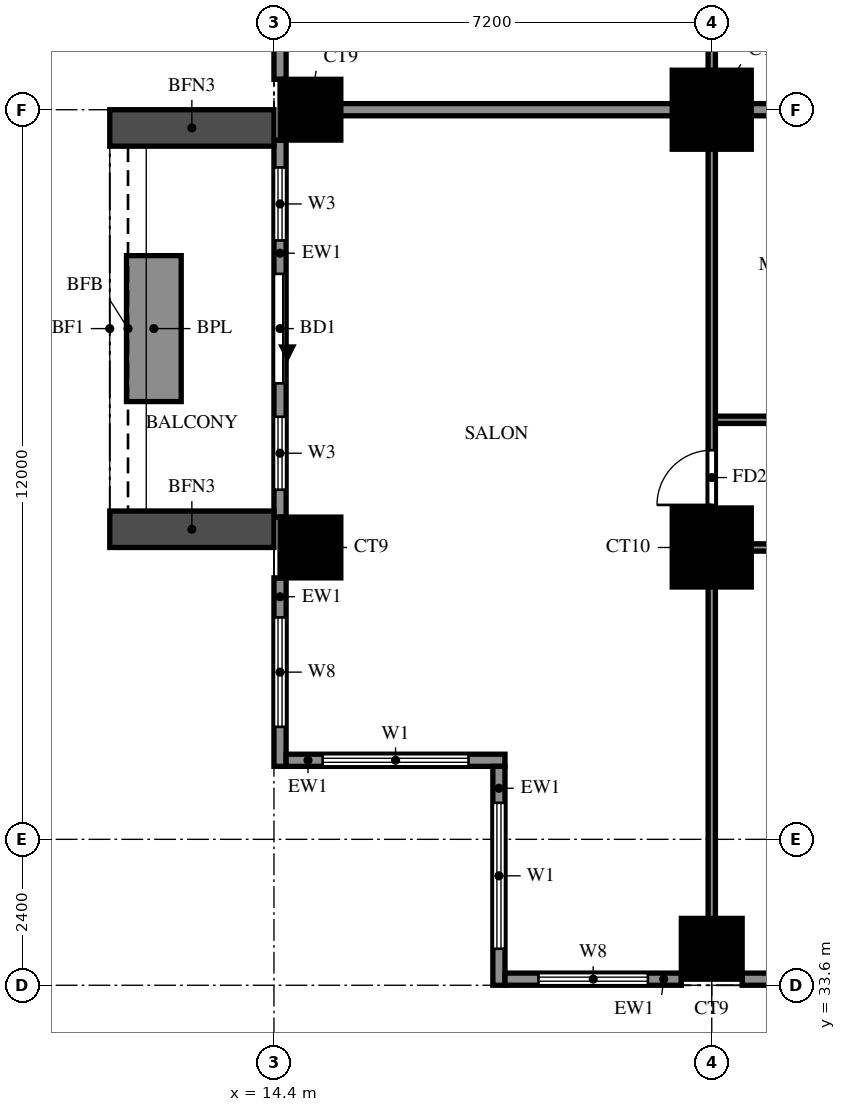
"""IFC4 building model, lengths in metres.
Left out: names, types, materials, properties, quantities, classifications, styles, units other than length and angle.
Written with IfcOpenShell. Run it as: python <this file> out.ifc"""

import sys

from ifc_helpers import new_model, si_unit, direction, frame, frame_2d, origin, origin_2d, place, context, subcontext, project, spatial, rectangle, extrude, source, transform, mapped, element, fill, save


model = new_model("IFC4")
c1 = context("Model", 3, precision=1e-05, world=origin(), true_north=direction((0.0, 1.0)))
c2 = subcontext(c1, "Body", "Model", "MODEL_VIEW")
j1 = project(units=[si_unit("LENGTHUNIT", "METRE"), si_unit("PLANEANGLEUNIT", "RADIAN")], contexts=[c1])
p1 = place(None, origin())
s1 = spatial("IfcSite", under=j1, at=p1, CompositionType="ELEMENT")
p2 = place(p1, origin())
s2 = spatial("IfcBuilding", under=s1, at=p2, CompositionType="ELEMENT")
p3 = place(p2, frame((0.0, 0.0, 69.0)))
s3 = spatial("IfcBuildingStorey", under=s2, at=p3, CompositionType="ELEMENT", Elevation=69.0)
m1 = source(origin(), c2, "Body", "SweptSolid", [
    extrude(rectangle(XDim=1.0, YDim=1.0, at=origin_2d()), origin(), (0.0, 0.0, 1.0), 3.18),
])
for number, where, z_axis, x_axis in (
    (1, (21.6, 34.2, 0.0), (0.0, 0.0, 1.0), (1.0, 0.0, 0.0)),
    (2, (15.0, 40.8, 0.0), (0.0, 0.0, 1.0), (1.0, 0.0, 0.0)),
):
    element("IfcColumn", number, at=place(p3, frame(where, z_axis=z_axis, x_axis=x_axis)), inside=s3, PredefinedType="COLUMN", context=c2, shape_type="MappedRepresentation", body=[
        mapped(m1, transform((0.0, 0.0, 0.0))),
    ])
m2 = source(origin(), c2, "Body", "SweptSolid", [
    extrude(rectangle(XDim=1.3, YDim=1.3, at=origin_2d()), origin(), (0.0, 0.0, 1.0), 3.18),
])
p4 = place(p3, frame((21.6, 40.8, 0.0), z_axis=(0.0, 0.0, 1.0), x_axis=(1.0, 0.0, 0.0)))
e3 = element("IfcColumn", 3, at=p4, inside=s3, PredefinedType="COLUMN", context=c2, shape_type="MappedRepresentation", body=[
    mapped(m2, transform((0.0, 0.0, 0.0))),
])
p5 = place(p3, frame((15.0, 48.0, 0.0), z_axis=(0.0, 0.0, 1.0), x_axis=(1.0, 0.0, 0.0)))
e4 = element("IfcColumn", 4, at=p5, inside=s3, PredefinedType="COLUMN", context=c2, shape_type="MappedRepresentation", body=[
    mapped(m1, transform((0.0, 0.0, 0.0))),
])
p6 = place(p3, frame((21.6, 48.0, 0.0), z_axis=(0.0, 0.0, 1.0), x_axis=(1.0, 0.0, 0.0)))
e5 = element("IfcColumn", 5, at=p6, inside=s3, PredefinedType="COLUMN", context=c2, shape_type="MappedRepresentation", body=[
    mapped(m2, transform((0.0, 0.0, 0.0))),
])
p7 = place(p3, frame((14.5, 54.7, 0.0), z_axis=(0.0, 0.0, 1.0), x_axis=(0.0, -1.0, 0.0)))
e6 = element("IfcWall", 6, at=p7, inside=s3, PredefinedType="SOLIDWALL", context=c2, shape_type="SweptSolid", body=[
    extrude(rectangle(XDim=6.2, YDim=0.2, at=frame_2d((3.1, 0.0))), origin(), (0.0, 0.0, 1.0), 3.18),
])
p8 = place(p7, frame((3.65, 0.0, 0.6)))
e7 = element("IfcOpeningElement", 7, at=p8, cuts=e6, PredefinedType="OPENING", context=c2, shape_type="SweptSolid", body=[
    extrude(rectangle(XDim=1.8, YDim=2.4, at=frame_2d((0.9, 1.2))), frame((0.0, 0.11, 0.0), z_axis=(0.0, -1.0, 0.0), x_axis=(1.0, 0.0, 0.0)), (0.0, 0.0, 1.0), 0.22),
])
p9 = place(p7, frame((0.75, 0.0, 0.6)))
e8 = element("IfcOpeningElement", 8, at=p9, cuts=e6, PredefinedType="OPENING", context=c2, shape_type="SweptSolid", body=[
    extrude(rectangle(XDim=1.8, YDim=2.4, at=frame_2d((0.9, 1.2))), frame((0.0, 0.11, 0.0), z_axis=(0.0, -1.0, 0.0), x_axis=(1.0, 0.0, 0.0)), (0.0, 0.0, 1.0), 0.22),
])
p10 = place(p3, frame((14.5, 47.5, 0.0), z_axis=(0.0, 0.0, 1.0), x_axis=(0.0, -1.0, 0.0)))
e9 = element("IfcWall", 9, at=p10, inside=s3, PredefinedType="SOLIDWALL", context=c2, shape_type="SweptSolid", body=[
    extrude(rectangle(XDim=6.2, YDim=0.2, at=frame_2d((3.1, 0.0))), origin(), (0.0, 0.0, 1.0), 3.18),
])
p11 = place(p10, frame((2.2, 0.0, 0.0)))
e10 = element("IfcOpeningElement", 10, at=p11, cuts=e9, PredefinedType="OPENING", context=c2, shape_type="SweptSolid", body=[
    extrude(rectangle(XDim=1.8, YDim=2.4, at=frame_2d((0.9, 1.2))), frame((0.0, 0.11, 0.0), z_axis=(0.0, -1.0, 0.0), x_axis=(1.0, 0.0, 0.0)), (0.0, 0.0, 1.0), 0.22),
])
p12 = place(p10, frame((0.45, 0.0, 0.6)))
e11 = element("IfcOpeningElement", 11, at=p12, cuts=e9, PredefinedType="OPENING", context=c2, shape_type="SweptSolid", body=[
    extrude(rectangle(XDim=1.2, YDim=2.4, at=frame_2d((0.6, 1.2))), frame((0.0, 0.11, 0.0), z_axis=(0.0, -1.0, 0.0), x_axis=(1.0, 0.0, 0.0)), (0.0, 0.0, 1.0), 0.22),
])
p13 = place(p10, frame((4.55, 0.0, 0.6)))
e12 = element("IfcOpeningElement", 12, at=p13, cuts=e9, PredefinedType="OPENING", context=c2, shape_type="SweptSolid", body=[
    extrude(rectangle(XDim=1.2, YDim=2.4, at=frame_2d((0.6, 1.2))), frame((0.0, 0.11, 0.0), z_axis=(0.0, -1.0, 0.0), x_axis=(1.0, 0.0, 0.0)), (0.0, 0.0, 1.0), 0.22),
])
p14 = place(p3, frame((14.5, 40.3, 0.0), z_axis=(0.0, 0.0, 1.0), x_axis=(0.0, -1.0, 0.0)))
e13 = element("IfcWall", 13, at=p14, inside=s3, PredefinedType="SOLIDWALL", context=c2, shape_type="SweptSolid", body=[
    extrude(rectangle(XDim=3.1, YDim=0.2, at=frame_2d((1.55, 0.0))), origin(), (0.0, 0.0, 1.0), 3.18),
])
p15 = place(p14, frame((0.65, 0.0, 0.6)))
e14 = element("IfcOpeningElement", 14, at=p15, cuts=e13, PredefinedType="OPENING", context=c2, shape_type="SweptSolid", body=[
    extrude(rectangle(XDim=1.8, YDim=2.4, at=frame_2d((0.9, 1.2))), frame((0.0, 0.11, 0.0), z_axis=(0.0, -1.0, 0.0), x_axis=(1.0, 0.0, 0.0)), (0.0, 0.0, 1.0), 0.22),
])
p16 = place(p3, frame((14.6, 37.3, 0.0), z_axis=(0.0, 0.0, 1.0), x_axis=(1.0, 0.0, 0.0)))
e15 = element("IfcWall", 15, at=p16, inside=s3, PredefinedType="SOLIDWALL", context=c2, shape_type="SweptSolid", body=[
    extrude(rectangle(XDim=3.6, YDim=0.2, at=frame_2d((1.8, 0.0))), origin(), (0.0, 0.0, 1.0), 3.18),
])
p17 = place(p16, frame((0.6, 0.0, 0.6)))
e16 = element("IfcOpeningElement", 16, at=p17, cuts=e15, PredefinedType="OPENING", context=c2, shape_type="SweptSolid", body=[
    extrude(rectangle(XDim=2.4, YDim=2.4, at=frame_2d((1.2, 1.2))), frame((0.0, 0.11, 0.0), z_axis=(0.0, -1.0, 0.0), x_axis=(1.0, 0.0, 0.0)), (0.0, 0.0, 1.0), 0.22),
])
p18 = place(p3, frame((18.1, 37.2, 0.0), z_axis=(0.0, 0.0, 1.0), x_axis=(0.0, -1.0, 0.0)))
e17 = element("IfcWall", 17, at=p18, inside=s3, PredefinedType="SOLIDWALL", context=c2, shape_type="SweptSolid", body=[
    extrude(rectangle(XDim=3.6, YDim=0.2, at=frame_2d((1.8, 0.0))), origin(), (0.0, 0.0, 1.0), 3.18),
])
p19 = place(p18, frame((0.6, 0.0, 0.6)))
e18 = element("IfcOpeningElement", 18, at=p19, cuts=e17, PredefinedType="OPENING", context=c2, shape_type="SweptSolid", body=[
    extrude(rectangle(XDim=2.4, YDim=2.4, at=frame_2d((1.2, 1.2))), frame((0.0, 0.11, 0.0), z_axis=(0.0, -1.0, 0.0), x_axis=(1.0, 0.0, 0.0)), (0.0, 0.0, 1.0), 0.22),
])
p20 = place(p3, frame((18.2, 33.7, 0.0), z_axis=(0.0, 0.0, 1.0), x_axis=(1.0, 0.0, 0.0)))
e19 = element("IfcWall", 19, at=p20, inside=s3, PredefinedType="SOLIDWALL", context=c2, shape_type="SweptSolid", body=[
    extrude(rectangle(XDim=2.9, YDim=0.2, at=frame_2d((1.45, 0.0))), origin(), (0.0, 0.0, 1.0), 3.18),
])
p21 = place(p20, frame((0.55, 0.0, 0.6)))
e20 = element("IfcOpeningElement", 20, at=p21, cuts=e19, PredefinedType="OPENING", context=c2, shape_type="SweptSolid", body=[
    extrude(rectangle(XDim=1.8, YDim=2.4, at=frame_2d((0.9, 1.2))), frame((0.0, 0.11, 0.0), z_axis=(0.0, -1.0, 0.0), x_axis=(1.0, 0.0, 0.0)), (0.0, 0.0, 1.0), 0.22),
])
p22 = place(p3, frame((22.1, 33.7, 0.0), z_axis=(0.0, 0.0, 1.0), x_axis=(1.0, 0.0, 0.0)))
e21 = element("IfcWall", 21, at=p22, inside=s3, PredefinedType="SOLIDWALL", context=c2, shape_type="SweptSolid", body=[
    extrude(rectangle(XDim=6.2, YDim=0.2, at=frame_2d((3.1, 0.0))), origin(), (0.0, 0.0, 1.0), 3.18),
])
p23 = place(p22, frame((4.0, 0.0, 0.0)))
e22 = element("IfcOpeningElement", 22, at=p23, cuts=e21, PredefinedType="OPENING", context=c2, shape_type="SweptSolid", body=[
    extrude(rectangle(XDim=1.8, YDim=2.4, at=frame_2d((0.9, 1.2))), frame((0.0, 0.11, 0.0), z_axis=(0.0, -1.0, 0.0), x_axis=(1.0, 0.0, 0.0)), (0.0, 0.0, 1.0), 0.22),
])
p24 = place(p22, frame((0.45, 0.0, 0.6)))
e23 = element("IfcOpeningElement", 23, at=p24, cuts=e21, PredefinedType="OPENING", context=c2, shape_type="SweptSolid", body=[
    extrude(rectangle(XDim=1.2, YDim=2.4, at=frame_2d((0.6, 1.2))), frame((0.0, 0.11, 0.0), z_axis=(0.0, -1.0, 0.0), x_axis=(1.0, 0.0, 0.0)), (0.0, 0.0, 1.0), 0.22),
])
for number, where, z_axis, x_axis in (
    (24, (14.4, 47.7, 0.0), (0.0, 0.0, 1.0), (-1.0, 0.0, 0.0)),
    (25, (14.4, 41.1, 0.0), (0.0, 0.0, 1.0), (-1.0, 0.0, 0.0)),
):
    element("IfcWall", number, at=place(p3, frame(where, z_axis=z_axis, x_axis=x_axis)), inside=s3, PredefinedType="SOLIDWALL", context=c2, shape_type="SweptSolid", body=[
        extrude(rectangle(XDim=2.7, YDim=0.6, at=frame_2d((1.35, 0.0))), origin(), (0.0, 0.0, 1.0), 2.85),
    ])
p25 = place(p3, frame((12.425, 45.6, 0.0), z_axis=(0.0, 0.0, 1.0), x_axis=(0.0, -1.0, 0.0)))
e26 = element("IfcWall", 26, at=p25, inside=s3, PredefinedType="SOLIDWALL", context=c2, shape_type="SweptSolid", body=[
    extrude(rectangle(XDim=2.4, YDim=0.9, at=frame_2d((1.2, 0.0))), origin(), (0.0, 0.0, 1.0), 0.9),
])
p26 = place(p3, frame((14.525, 48.0, 0.0), z_axis=(0.0, 0.0, 1.0), x_axis=(1.0, 0.0, 0.0)))
e27 = element("IfcWall", 27, at=p26, inside=s3, PredefinedType="SOLIDWALL", context=c2, shape_type="SweptSolid", body=[
    extrude(rectangle(XDim=19.075, YDim=0.2, at=frame_2d((9.538, 0.0))), origin(), (0.0, 0.0, 1.0), 3.18),
])
p27 = place(p3, frame((21.6, 40.8, 0.0), z_axis=(0.0, 0.0, 1.0), x_axis=(1.0, 0.0, 0.0)))
e28 = element("IfcWall", 28, at=p27, inside=s3, PredefinedType="PARTITIONING", context=c2, shape_type="SweptSolid", body=[
    extrude(rectangle(XDim=10.8, YDim=0.12, at=frame_2d((5.4, 0.0))), origin(), (0.0, 0.0, 1.0), 3.18),
])
p28 = place(p27, frame((1.35, 0.0, 0.0)))
e29 = element("IfcOpeningElement", 29, at=p28, cuts=e28, PredefinedType="OPENING", context=c2, shape_type="SweptSolid", body=[
    extrude(rectangle(XDim=0.9, YDim=2.1, at=frame_2d((0.45, 1.05))), frame((0.0, 0.07, 0.0), z_axis=(0.0, -1.0, 0.0), x_axis=(1.0, 0.0, 0.0)), (0.0, 0.0, 1.0), 0.14),
])
p29 = place(p27, frame((4.95, 0.0, 0.0)))
e30 = element("IfcOpeningElement", 30, at=p29, cuts=e28, PredefinedType="OPENING", context=c2, shape_type="SweptSolid", body=[
    extrude(rectangle(XDim=0.9, YDim=2.1, at=frame_2d((0.45, 1.05))), frame((0.0, 0.07, 0.0), z_axis=(0.0, -1.0, 0.0), x_axis=(1.0, 0.0, 0.0)), (0.0, 0.0, 1.0), 0.14),
])
p30 = place(p27, frame((8.55, 0.0, 0.0)))
e31 = element("IfcOpeningElement", 31, at=p30, cuts=e28, PredefinedType="OPENING", context=c2, shape_type="SweptSolid", body=[
    extrude(rectangle(XDim=0.9, YDim=2.1, at=frame_2d((0.45, 1.05))), frame((0.0, 0.07, 0.0), z_axis=(0.0, -1.0, 0.0), x_axis=(1.0, 0.0, 0.0)), (0.0, 0.0, 1.0), 0.14),
])
p31 = place(p3, frame((21.6, 42.9, 0.0), z_axis=(0.0, 0.0, 1.0), x_axis=(1.0, 0.0, 0.0)))
e32 = element("IfcWall", 32, at=p31, inside=s3, PredefinedType="PARTITIONING", context=c2, shape_type="SweptSolid", body=[
    extrude(rectangle(XDim=16.8, YDim=0.12, at=frame_2d((8.4, 0.0))), origin(), (0.0, 0.0, 1.0), 3.18),
])
p32 = place(p31, frame((1.375, 0.0, 0.0)))
e33 = element("IfcOpeningElement", 33, at=p32, cuts=e32, PredefinedType="OPENING", context=c2, shape_type="SweptSolid", body=[
    extrude(rectangle(XDim=0.9, YDim=2.1, at=frame_2d((0.45, 1.05))), frame((0.0, 0.07, 0.0), z_axis=(0.0, -1.0, 0.0), x_axis=(1.0, 0.0, 0.0)), (0.0, 0.0, 1.0), 0.14),
])
p33 = place(p31, frame((5.5, 0.0, 0.0)))
e34 = element("IfcOpeningElement", 34, at=p33, cuts=e32, PredefinedType="OPENING", context=c2, shape_type="SweptSolid", body=[
    extrude(rectangle(XDim=0.9, YDim=2.1, at=frame_2d((0.45, 1.05))), frame((0.0, 0.07, 0.0), z_axis=(0.0, -1.0, 0.0), x_axis=(1.0, 0.0, 0.0)), (0.0, 0.0, 1.0), 0.14),
])
p34 = place(p31, frame((9.725, 0.0, 0.0)))
e35 = element("IfcOpeningElement", 35, at=p34, cuts=e32, PredefinedType="OPENING", context=c2, shape_type="SweptSolid", body=[
    extrude(rectangle(XDim=0.8, YDim=2.1, at=frame_2d((0.4, 1.05))), frame((0.0, 0.07, 0.0), z_axis=(0.0, -1.0, 0.0), x_axis=(1.0, 0.0, 0.0)), (0.0, 0.0, 1.0), 0.14),
])
p35 = place(p31, frame((13.95, 0.0, 0.0)))
e36 = element("IfcOpeningElement", 36, at=p35, cuts=e32, PredefinedType="OPENING", context=c2, shape_type="SweptSolid", body=[
    extrude(rectangle(XDim=0.9, YDim=2.1, at=frame_2d((0.45, 1.05))), frame((0.0, 0.07, 0.0), z_axis=(0.0, -1.0, 0.0), x_axis=(1.0, 0.0, 0.0)), (0.0, 0.0, 1.0), 0.14),
])
p36 = place(p3, frame((21.6, 33.725, 0.0), z_axis=(0.0, 0.0, 1.0), x_axis=(0.0, 1.0, 0.0)))
e37 = element("IfcWall", 37, at=p36, inside=s3, PredefinedType="PARTITIONING", context=c2, shape_type="SweptSolid", body=[
    extrude(rectangle(XDim=39.475, YDim=0.12, at=frame_2d((19.737, 0.0))), origin(), (0.0, 0.0, 1.0), 3.18),
])
p37 = place(p36, frame((7.775, 0.0, 0.0)))
e38 = element("IfcOpeningElement", 38, at=p37, cuts=e37, PredefinedType="OPENING", context=c2, shape_type="SweptSolid", body=[
    extrude(rectangle(XDim=0.9, YDim=2.1, at=frame_2d((0.45, 1.05))), frame((0.0, 0.07, 0.0), z_axis=(0.0, -1.0, 0.0), x_axis=(1.0, 0.0, 0.0)), (0.0, 0.0, 1.0), 0.14),
])
p38 = place(p36, frame((15.625, 0.0, 0.0)))
e39 = element("IfcOpeningElement", 39, at=p38, cuts=e37, PredefinedType="OPENING", context=c2, shape_type="SweptSolid", body=[
    extrude(rectangle(XDim=0.9, YDim=2.1, at=frame_2d((0.45, 1.05))), frame((0.0, 0.07, 0.0), z_axis=(0.0, -1.0, 0.0), x_axis=(1.0, 0.0, 0.0)), (0.0, 0.0, 1.0), 0.14),
])
p39 = place(p36, frame((19.225, 0.0, 0.0)))
e40 = element("IfcOpeningElement", 40, at=p39, cuts=e37, PredefinedType="OPENING", context=c2, shape_type="SweptSolid", body=[
    extrude(rectangle(XDim=0.9, YDim=2.1, at=frame_2d((0.45, 1.05))), frame((0.0, 0.07, 0.0), z_axis=(0.0, -1.0, 0.0), x_axis=(1.0, 0.0, 0.0)), (0.0, 0.0, 1.0), 0.14),
])
p40 = place(p36, frame((24.325, 0.0, 0.0)))
e41 = element("IfcOpeningElement", 41, at=p40, cuts=e37, PredefinedType="OPENING", context=c2, shape_type="SweptSolid", body=[
    extrude(rectangle(XDim=1.5, YDim=2.1, at=frame_2d((0.75, 1.05))), frame((0.0, 0.07, 0.0), z_axis=(0.0, -1.0, 0.0), x_axis=(1.0, 0.0, 0.0)), (0.0, 0.0, 1.0), 0.14),
])
p41 = place(p36, frame((30.025, 0.0, 0.0)))
e42 = element("IfcOpeningElement", 42, at=p41, cuts=e37, PredefinedType="OPENING", context=c2, shape_type="SweptSolid", body=[
    extrude(rectangle(XDim=0.9, YDim=2.1, at=frame_2d((0.45, 1.05))), frame((0.0, 0.07, 0.0), z_axis=(0.0, -1.0, 0.0), x_axis=(1.0, 0.0, 0.0)), (0.0, 0.0, 1.0), 0.14),
])
p42 = place(p36, frame((33.625, 0.0, 0.0)))
e43 = element("IfcOpeningElement", 43, at=p42, cuts=e37, PredefinedType="OPENING", context=c2, shape_type="SweptSolid", body=[
    extrude(rectangle(XDim=0.9, YDim=2.1, at=frame_2d((0.45, 1.05))), frame((0.0, 0.07, 0.0), z_axis=(0.0, -1.0, 0.0), x_axis=(1.0, 0.0, 0.0)), (0.0, 0.0, 1.0), 0.14),
])
p43 = place(p36, frame((37.225, 0.0, 0.0)))
e44 = element("IfcOpeningElement", 44, at=p43, cuts=e37, PredefinedType="OPENING", context=c2, shape_type="SweptSolid", body=[
    extrude(rectangle(XDim=0.9, YDim=2.1, at=frame_2d((0.45, 1.05))), frame((0.0, 0.07, 0.0), z_axis=(0.0, -1.0, 0.0), x_axis=(1.0, 0.0, 0.0)), (0.0, 0.0, 1.0), 0.14),
])
p44 = place(p11, origin())
e45 = element("IfcDoor", 45, at=p44, inside=s3, OperationType="DOUBLE_DOOR_SLIDING", PredefinedType="DOOR", context=c2, shape_type="SweptSolid", body=[
    extrude(rectangle(XDim=1.8, YDim=2.4, at=frame_2d((0.9, 1.2))), frame((0.0, 0.025, 0.0), z_axis=(0.0, -1.0, 0.0), x_axis=(1.0, 0.0, 0.0)), (0.0, 0.0, 1.0), 0.05),
])
fill(e10, e45)
p45 = place(p12, origin())
e46 = element("IfcWindow", 46, at=p45, inside=s3, PartitioningType="SINGLE_PANEL", PredefinedType="WINDOW", context=c2, shape_type="SweptSolid", body=[
    extrude(rectangle(XDim=1.2, YDim=2.4, at=frame_2d((0.6, 1.2))), frame((0.0, 0.03, 0.0), z_axis=(0.0, -1.0, 0.0), x_axis=(1.0, 0.0, 0.0)), (0.0, 0.0, 1.0), 0.06),
])
fill(e11, e46)
p46 = place(p13, origin())
e47 = element("IfcWindow", 47, at=p46, inside=s3, PartitioningType="SINGLE_PANEL", PredefinedType="WINDOW", context=c2, shape_type="SweptSolid", body=[
    extrude(rectangle(XDim=1.2, YDim=2.4, at=frame_2d((0.6, 1.2))), frame((0.0, 0.03, 0.0), z_axis=(0.0, -1.0, 0.0), x_axis=(1.0, 0.0, 0.0)), (0.0, 0.0, 1.0), 0.06),
])
fill(e12, e47)
p47 = place(p15, origin())
e48 = element("IfcWindow", 48, at=p47, inside=s3, PartitioningType="DOUBLE_PANEL_VERTICAL", PredefinedType="WINDOW", context=c2, shape_type="SweptSolid", body=[
    extrude(rectangle(XDim=1.8, YDim=2.4, at=frame_2d((0.9, 1.2))), frame((0.0, 0.03, 0.0), z_axis=(0.0, -1.0, 0.0), x_axis=(1.0, 0.0, 0.0)), (0.0, 0.0, 1.0), 0.06),
])
fill(e14, e48)
p48 = place(p17, origin())
e49 = element("IfcWindow", 49, at=p48, inside=s3, PartitioningType="DOUBLE_PANEL_VERTICAL", PredefinedType="WINDOW", context=c2, shape_type="SweptSolid", body=[
    extrude(rectangle(XDim=2.4, YDim=2.4, at=frame_2d((1.2, 1.2))), frame((0.0, 0.03, 0.0), z_axis=(0.0, -1.0, 0.0), x_axis=(1.0, 0.0, 0.0)), (0.0, 0.0, 1.0), 0.06),
])
fill(e16, e49)
p49 = place(p19, origin())
e50 = element("IfcWindow", 50, at=p49, inside=s3, PartitioningType="DOUBLE_PANEL_VERTICAL", PredefinedType="WINDOW", context=c2, shape_type="SweptSolid", body=[
    extrude(rectangle(XDim=2.4, YDim=2.4, at=frame_2d((1.2, 1.2))), frame((0.0, 0.03, 0.0), z_axis=(0.0, -1.0, 0.0), x_axis=(1.0, 0.0, 0.0)), (0.0, 0.0, 1.0), 0.06),
])
fill(e18, e50)
p50 = place(p21, origin())
e51 = element("IfcWindow", 51, at=p50, inside=s3, PartitioningType="DOUBLE_PANEL_VERTICAL", PredefinedType="WINDOW", context=c2, shape_type="SweptSolid", body=[
    extrude(rectangle(XDim=1.8, YDim=2.4, at=frame_2d((0.9, 1.2))), frame((0.0, 0.03, 0.0), z_axis=(0.0, -1.0, 0.0), x_axis=(1.0, 0.0, 0.0)), (0.0, 0.0, 1.0), 0.06),
])
fill(e20, e51)
p51 = place(p37, origin())
e52 = element("IfcDoor", 52, at=p51, inside=s3, OperationType="SINGLE_SWING_LEFT", PredefinedType="DOOR", context=c2, shape_type="SweptSolid", body=[
    extrude(rectangle(XDim=0.9, YDim=2.1, at=frame_2d((0.45, 1.05))), frame((0.0, 0.025, 0.0), z_axis=(0.0, -1.0, 0.0), x_axis=(1.0, 0.0, 0.0)), (0.0, 0.0, 1.0), 0.05),
])
fill(e38, e52)
save(model, sys.argv[1])
